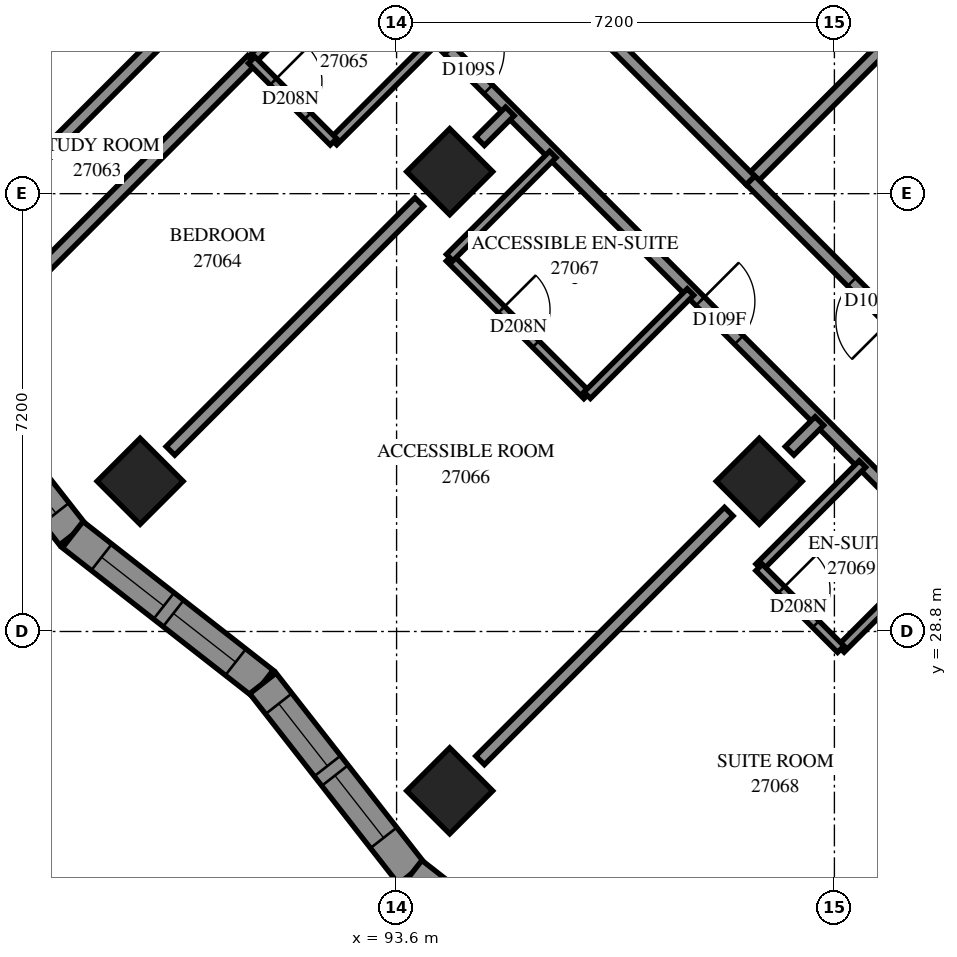
"""IFC4 building model, lengths in metres.
Left out: names, types, materials, properties, quantities, classifications, styles, units other than length and angle.
Written with IfcOpenShell. Run it as: python <this file> out.ifc"""

import sys

from ifc_helpers import new_model, si_unit, direction, frame, frame_2d, origin, origin_2d, place, context, subcontext, project, spatial, polyline, rectangle, outline, extrude, element, fill, save


model = new_model("IFC4")
c1 = context("Model", 3, precision=1e-05, world=origin(), true_north=direction((0.0, 1.0)))
c2 = subcontext(c1, "Body", "Model", "MODEL_VIEW")
j1 = project(units=[si_unit("LENGTHUNIT", "METRE"), si_unit("PLANEANGLEUNIT", "RADIAN")], contexts=[c1])
p1 = place(None, origin())
s1 = spatial("IfcSite", under=j1, at=p1, CompositionType="ELEMENT")
p2 = place(p1, origin())
s2 = spatial("IfcBuilding", under=s1, at=p2, CompositionType="ELEMENT")
p3 = place(p2, frame((0.0, 0.0, 101.6)))
s3 = spatial("IfcBuildingStorey", under=s2, at=p3, CompositionType="ELEMENT", Elevation=101.6)
for number, where, z_axis, x_axis in (
    (1, (94.474, 36.362, 0.0), (0.0, 0.0, 1.0), (0.707, -0.707, 0.0)),
    (2, (89.382, 31.271, 0.0), (0.0, 0.0, 1.0), (0.707, -0.707, 0.0)),
    (3, (99.565, 31.271, 0.0), (0.0, 0.0, 1.0), (0.707, -0.707, 0.0)),
    (4, (94.474, 26.18, 0.0), (0.0, 0.0, 1.0), (0.707, -0.707, 0.0)),
):
    element("IfcColumn", number, at=place(p3, frame(where, z_axis=z_axis, x_axis=x_axis)), inside=s3, PredefinedType="COLUMN", context=c2, shape_type="SweptSolid", body=[
        extrude(rectangle(XDim=1.0, YDim=1.0, at=origin_2d()), origin(), (0.0, 0.0, 1.0), 3.1),
    ])
p4 = place(p3, frame((85.828, 33.52, 0.0), z_axis=(0.0, 0.0, 1.0), x_axis=(0.6160188877, -0.7877313819, 0.0)))
e5 = element("IfcWall", 5, at=p4, inside=s3, PredefinedType="SOLIDWALL", context=c2, shape_type="SweptSolid", body=[
    extrude(outline(polyline([(0.034, -0.275), (4.004, -0.275), (3.936, 0.275), (-0.034, 0.275), (0.034, -0.275)])), origin(), (0.0, 0.0, 1.0), 3.1),
])
p5 = place(p4, frame((0.722, 0.0, 0.5)))
e6 = element("IfcOpeningElement", 6, at=p5, cuts=e5, PredefinedType="OPENING", context=c2, shape_type="SweptSolid", body=[
    extrude(rectangle(XDim=1.3, YDim=2.45, at=frame_2d((0.65, 1.225))), frame((0.0, 0.285, 0.0), z_axis=(0.0, -1.0, 0.0), x_axis=(1.0, 0.0, 0.0)), (0.0, 0.0, 1.0), 0.57),
])
p6 = place(p4, frame((2.222, 0.0, 0.5)))
e7 = element("IfcOpeningElement", 7, at=p6, cuts=e5, PredefinedType="OPENING", context=c2, shape_type="SweptSolid", body=[
    extrude(rectangle(XDim=1.3, YDim=2.45, at=frame_2d((0.65, 1.225))), frame((0.0, 0.285, 0.0), z_axis=(0.0, -1.0, 0.0), x_axis=(1.0, 0.0, 0.0)), (0.0, 0.0, 1.0), 0.57),
])
p7 = place(p3, frame((88.274, 30.392, 0.0), z_axis=(0.0, 0.0, 1.0), x_axis=(0.7877191588, -0.6160345176, 0.0)))
e8 = element("IfcWall", 8, at=p7, inside=s3, PredefinedType="SOLIDWALL", context=c2, shape_type="SweptSolid", body=[
    extrude(outline(polyline([(-0.034, -0.275), (3.936, -0.275), (4.004, 0.275), (0.034, 0.275), (-0.034, -0.275)])), origin(), (0.0, 0.0, 1.0), 3.1),
])
p8 = place(p7, frame((0.602, 0.0, 0.5)))
e9 = element("IfcOpeningElement", 9, at=p8, cuts=e8, PredefinedType="OPENING", context=c2, shape_type="SweptSolid", body=[
    extrude(rectangle(XDim=1.3, YDim=2.45, at=frame_2d((0.65, 1.225))), frame((0.0, 0.285, 0.0), z_axis=(0.0, -1.0, 0.0), x_axis=(1.0, 0.0, 0.0)), (0.0, 0.0, 1.0), 0.57),
])
p9 = place(p7, frame((2.102, 0.0, 0.5)))
e10 = element("IfcOpeningElement", 10, at=p9, cuts=e8, PredefinedType="OPENING", context=c2, shape_type="SweptSolid", body=[
    extrude(rectangle(XDim=1.3, YDim=2.45, at=frame_2d((0.65, 1.225))), frame((0.0, 0.285, 0.0), z_axis=(0.0, -1.0, 0.0), x_axis=(1.0, 0.0, 0.0)), (0.0, 0.0, 1.0), 0.57),
])
p10 = place(p3, frame((91.401, 27.947, 0.0), z_axis=(0.0, 0.0, 1.0), x_axis=(0.6160345176, -0.7877191588, 0.0)))
e11 = element("IfcWall", 11, at=p10, inside=s3, PredefinedType="SOLIDWALL", context=c2, shape_type="SweptSolid", body=[
    extrude(outline(polyline([(0.034, -0.275), (4.004, -0.275), (3.936, 0.275), (-0.034, 0.275), (0.034, -0.275)])), origin(), (0.0, 0.0, 1.0), 3.1),
])
p11 = place(p10, frame((0.424, 0.0, 0.5)))
e12 = element("IfcOpeningElement", 12, at=p11, cuts=e11, PredefinedType="OPENING", context=c2, shape_type="SweptSolid", body=[
    extrude(rectangle(XDim=1.3, YDim=2.45, at=frame_2d((0.65, 1.225))), frame((0.0, 0.285, 0.0), z_axis=(0.0, -1.0, 0.0), x_axis=(1.0, 0.0, 0.0)), (0.0, 0.0, 1.0), 0.57),
])
p12 = place(p10, frame((1.924, 0.0, 0.5)))
e13 = element("IfcOpeningElement", 13, at=p12, cuts=e11, PredefinedType="OPENING", context=c2, shape_type="SweptSolid", body=[
    extrude(rectangle(XDim=1.3, YDim=2.45, at=frame_2d((0.65, 1.225))), frame((0.0, 0.285, 0.0), z_axis=(0.0, -1.0, 0.0), x_axis=(1.0, 0.0, 0.0)), (0.0, 0.0, 1.0), 0.57),
])
p13 = place(p3, frame((93.847, 24.819, 0.0), z_axis=(0.0, 0.0, 1.0), x_axis=(0.7877370809, -0.6160116001, 0.0)))
e14 = element("IfcWall", 14, at=p13, inside=s3, PredefinedType="SOLIDWALL", context=c2, shape_type="SweptSolid", body=[
    extrude(outline(polyline([(-0.034, -0.275), (3.936, -0.275), (4.045, 0.275), (0.034, 0.275), (-0.034, -0.275)])), origin(), (0.0, 0.0, 1.0), 3.1),
])
p14 = place(p13, frame((1.069, 0.0, 0.5)))
e15 = element("IfcOpeningElement", 15, at=p14, cuts=e14, PredefinedType="OPENING", context=c2, shape_type="SweptSolid", body=[
    extrude(rectangle(XDim=1.2, YDim=2.45, at=frame_2d((0.6, 1.225))), frame((0.0, 0.285, 0.0), z_axis=(0.0, -1.0, 0.0), x_axis=(1.0, 0.0, 0.0)), (0.0, 0.0, 1.0), 0.57),
])
p15 = place(p3, frame((92.004, 40.819, 0.0), z_axis=(0.0, 0.0, 1.0), x_axis=(0.7071067812, -0.7071067812, 0.0)))
e16 = element("IfcWall", 16, at=p15, inside=s3, PredefinedType="PARTITIONING", context=c2, shape_type="SweptSolid", body=[
    extrude(rectangle(XDim=19.298, YDim=0.2, at=frame_2d((9.649, 0.0))), origin(), (0.0, 0.0, 1.0), 3.1),
])
p16 = place(p15, frame((3.489, 0.0, 0.0)))
e17 = element("IfcOpeningElement", 17, at=p16, cuts=e16, PredefinedType="OPENING", context=c2, shape_type="SweptSolid", body=[
    extrude(rectangle(XDim=0.9, YDim=2.1, at=frame_2d((0.45, 1.05))), frame((0.0, 0.11, 0.0), z_axis=(0.0, -1.0, 0.0), x_axis=(1.0, 0.0, 0.0)), (0.0, 0.0, 1.0), 0.22),
])
p17 = place(p15, frame((9.319, 0.0, 0.0)))
e18 = element("IfcOpeningElement", 18, at=p17, cuts=e16, PredefinedType="OPENING", context=c2, shape_type="SweptSolid", body=[
    extrude(rectangle(XDim=0.9, YDim=2.1, at=frame_2d((0.45, 1.05))), frame((0.0, 0.11, 0.0), z_axis=(0.0, -1.0, 0.0), x_axis=(1.0, 0.0, 0.0)), (0.0, 0.0, 1.0), 0.22),
])
p18 = place(p15, frame((15.961, 0.0, 0.0)))
e19 = element("IfcOpeningElement", 19, at=p18, cuts=e16, PredefinedType="OPENING", context=c2, shape_type="SweptSolid", body=[
    extrude(rectangle(XDim=0.9, YDim=2.1, at=frame_2d((0.45, 1.05))), frame((0.0, 0.11, 0.0), z_axis=(0.0, -1.0, 0.0), x_axis=(1.0, 0.0, 0.0)), (0.0, 0.0, 1.0), 0.22),
])
p19 = place(p3, frame((99.423, 36.221, 0.0), z_axis=(0.0, 0.0, 1.0), x_axis=(0.7071067812, 0.7071067812, 0.0)))
e20 = element("IfcWall", 20, at=p19, inside=s3, PredefinedType="PARTITIONING", context=c2, shape_type="SweptSolid", body=[
    extrude(rectangle(XDim=12.072, YDim=0.2, at=frame_2d((6.036, 0.0))), origin(), (0.0, 0.0, 1.0), 3.1),
])
p20 = place(p3, frame((93.411, 42.227, 0.0), z_axis=(0.0, 0.0, 1.0), x_axis=(0.7071067812, -0.7071067812, 0.0)))
e21 = element("IfcWall", 21, at=p20, inside=s3, PredefinedType="PARTITIONING", context=c2, shape_type="SweptSolid", body=[
    extrude(rectangle(XDim=8.499, YDim=0.2, at=frame_2d((4.25, 0.0))), origin(), (0.0, 0.0, 1.0), 3.1),
])
p21 = place(p20, frame((3.672, 0.0, 0.0)))
e22 = element("IfcOpeningElement", 22, at=p21, cuts=e21, PredefinedType="OPENING", context=c2, shape_type="SweptSolid", body=[
    extrude(rectangle(XDim=1.0, YDim=2.1, at=frame_2d((0.5, 1.05))), frame((0.0, 0.11, 0.0), z_axis=(0.0, -1.0, 0.0), x_axis=(1.0, 0.0, 0.0)), (0.0, 0.0, 1.0), 0.22),
])
p22 = place(p3, frame((86.835, 35.655, 0.0), z_axis=(0.0, 0.0, 1.0), x_axis=(0.7071067812, 0.7071067812, 0.0)))
e23 = element("IfcWall", 23, at=p22, inside=s3, PredefinedType="PARTITIONING", context=c2, shape_type="SweptSolid", body=[
    extrude(rectangle(XDim=7.3, YDim=0.2, at=frame_2d((3.65, 0.0))), origin(), (0.0, 0.0, 1.0), 3.1),
])
p23 = place(p22, frame((6.046, 0.0, 0.0)))
e24 = element("IfcOpeningElement", 24, at=p23, cuts=e23, PredefinedType="OPENING", context=c2, shape_type="SweptSolid", body=[
    extrude(rectangle(XDim=1.0, YDim=2.1, at=frame_2d((0.5, 1.05))), frame((0.0, 0.11, 0.0), z_axis=(0.0, -1.0, 0.0), x_axis=(1.0, 0.0, 0.0)), (0.0, 0.0, 1.0), 0.22),
])
p24 = place(p3, frame((86.337, 33.315, 0.0), z_axis=(0.0, 0.0, 1.0), x_axis=(0.7069692223, 0.7072443133, 0.0)))
e25 = element("IfcWall", 25, at=p24, inside=s3, PredefinedType="PARTITIONING", context=c2, shape_type="SweptSolid", body=[
    extrude(rectangle(XDim=6.907, YDim=0.2, at=frame_2d((3.453, 0.0))), origin(), (0.0, 0.0, 1.0), 3.1),
])
p25 = place(p3, frame((89.881, 31.771, 0.0), z_axis=(0.0, 0.0, 1.0), x_axis=(0.7071067812, 0.7071067812, 0.0)))
e26 = element("IfcWall", 26, at=p25, inside=s3, PredefinedType="PARTITIONING", context=c2, shape_type="SweptSolid", body=[
    extrude(rectangle(XDim=5.787, YDim=0.2, at=frame_2d((2.893, 0.0))), origin(), (0.0, 0.0, 1.0), 3.1),
])
p26 = place(p3, frame((100.063, 21.589, 0.0), z_axis=(0.0, 0.0, 1.0), x_axis=(0.7071067812, 0.7071067812, 0.0)))
e27 = element("IfcWall", 27, at=p26, inside=s3, PredefinedType="PARTITIONING", context=c2, shape_type="SweptSolid", body=[
    extrude(rectangle(XDim=5.787, YDim=0.2, at=frame_2d((2.893, 0.0))), origin(), (0.0, 0.0, 1.0), 2.6),
])
p27 = place(p3, frame((94.973, 26.681, 0.0), z_axis=(0.0, 0.0, 1.0), x_axis=(0.7071067812, 0.7071067812, 0.0)))
e28 = element("IfcWall", 28, at=p27, inside=s3, PredefinedType="PARTITIONING", context=c2, shape_type="SweptSolid", body=[
    extrude(rectangle(XDim=5.784, YDim=0.2, at=frame_2d((2.892, 0.0))), origin(), (0.0, 0.0, 1.0), 3.1),
])
p28 = place(p3, frame((103.168, 32.47, 0.0), z_axis=(0.0, 0.0, 1.0), x_axis=(-0.7067858967, 0.7074275201, 0.0)))
e29 = element("IfcWall", 29, at=p28, inside=s3, PredefinedType="PARTITIONING", context=c2, shape_type="SweptSolid", body=[
    extrude(rectangle(XDim=5.299, YDim=0.2, at=frame_2d((2.65, 0.0))), origin(), (0.0, 0.0, 1.0), 3.1),
])
p29 = place(p28, frame((2.043, 0.0, 0.0)))
e30 = element("IfcOpeningElement", 30, at=p29, cuts=e29, PredefinedType="OPENING", context=c2, shape_type="SweptSolid", body=[
    extrude(rectangle(XDim=0.9, YDim=2.1, at=frame_2d((0.45, 1.05))), frame((0.0, 0.11, 0.0), z_axis=(0.0, -1.0, 0.0), x_axis=(1.0, 0.0, 0.0)), (0.0, 0.0, 1.0), 0.22),
])
p30 = place(p3, frame((94.471, 34.945, 0.0), z_axis=(0.0, 0.0, 1.0), x_axis=(0.7067942478, -0.7074191764, 0.0)))
e31 = element("IfcWall", 31, at=p30, inside=s3, PredefinedType="PARTITIONING", context=c2, shape_type="SweptSolid", body=[
    extrude(rectangle(XDim=3.2, YDim=0.15, at=frame_2d((1.6, 0.0))), origin(), (0.0, 0.0, 1.0), 3.1),
])
p31 = place(p30, frame((1.206, 0.0, 0.0)))
e32 = element("IfcOpeningElement", 32, at=p31, cuts=e31, PredefinedType="OPENING", context=c2, shape_type="SweptSolid", body=[
    extrude(rectangle(XDim=0.8, YDim=2.1, at=frame_2d((0.4, 1.05))), frame((0.0, 0.085, 0.0), z_axis=(0.0, -1.0, 0.0), x_axis=(1.0, 0.0, 0.0)), (0.0, 0.0, 1.0), 0.17),
])
for number, where, z_axis, x_axis in (
    (33, (92.563, 36.857, 0.0), (0.0, 0.0, 1.0), (0.707, 0.707, 0.0)),
    (34, (91.219, 38.201, 0.0), (0.0, 0.0, 1.0), (0.707, 0.707, 0.0)),
    (35, (96.735, 32.685, 0.0), (0.0, 0.0, 1.0), (0.707, 0.707, 0.0)),
    (36, (99.563, 29.857, 0.0), (0.0, 0.0, 1.0), (0.707, 0.707, 0.0)),
    (37, (100.907, 28.513, 0.0), (0.0, 0.0, 1.0), (0.707, 0.707, 0.0)),
):
    element("IfcWall", number, at=place(p3, frame(where, z_axis=z_axis, x_axis=x_axis)), inside=s3, PredefinedType="PARTITIONING", context=c2, shape_type="SweptSolid", body=[
        extrude(rectangle(XDim=2.401, YDim=0.15, at=frame_2d((1.201, 0.0))), origin(), (0.0, 0.0, 1.0), 3.1),
    ])
p32 = place(p3, frame((94.473, 34.949, 0.0), z_axis=(0.0, 0.0, 1.0), x_axis=(0.7071067812, 0.7071067812, 0.0)))
e38 = element("IfcWall", 38, at=p32, inside=s3, PredefinedType="PARTITIONING", context=c2, shape_type="SweptSolid", body=[
    extrude(rectangle(XDim=2.398, YDim=0.15, at=frame_2d((1.199, 0.0))), origin(), (0.0, 0.0, 1.0), 3.1),
])
p33 = place(p3, frame((99.561, 29.853, 0.0), z_axis=(0.0, 0.0, 1.0), x_axis=(0.7071067812, -0.7071067812, 0.0)))
e39 = element("IfcWall", 39, at=p33, inside=s3, PredefinedType="PARTITIONING", context=c2, shape_type="SweptSolid", body=[
    extrude(rectangle(XDim=1.901, YDim=0.15, at=frame_2d((0.95, 0.0))), origin(), (0.0, 0.0, 1.0), 3.1),
])
p34 = place(p33, frame((0.519, 0.0, 0.0)))
e40 = element("IfcOpeningElement", 40, at=p34, cuts=e39, PredefinedType="OPENING", context=c2, shape_type="SweptSolid", body=[
    extrude(rectangle(XDim=0.8, YDim=2.1, at=frame_2d((0.4, 1.05))), frame((0.0, 0.085, 0.0), z_axis=(0.0, -1.0, 0.0), x_axis=(1.0, 0.0, 0.0)), (0.0, 0.0, 1.0), 0.17),
])
p35 = place(p3, frame((91.217, 38.197, 0.0), z_axis=(0.0, 0.0, 1.0), x_axis=(0.7071067812, -0.7071067812, 0.0)))
e41 = element("IfcWall", 41, at=p35, inside=s3, PredefinedType="PARTITIONING", context=c2, shape_type="SweptSolid", body=[
    extrude(rectangle(XDim=1.901, YDim=0.15, at=frame_2d((0.95, 0.0))), origin(), (0.0, 0.0, 1.0), 3.1),
])
p36 = place(p35, frame((0.502, 0.0, 0.0)))
e42 = element("IfcOpeningElement", 42, at=p36, cuts=e41, PredefinedType="OPENING", context=c2, shape_type="SweptSolid", body=[
    extrude(rectangle(XDim=0.8, YDim=2.1, at=frame_2d((0.4, 1.05))), frame((0.0, 0.085, 0.0), z_axis=(0.0, -1.0, 0.0), x_axis=(1.0, 0.0, 0.0)), (0.0, 0.0, 1.0), 0.17),
])
for number, where, z_axis, x_axis in (
    (43, (94.973, 36.863, 0.0), (0.0, 0.0, 1.0), (0.707, 0.707, 0.0)),
    (44, (100.063, 31.771, 0.0), (0.0, 0.0, 1.0), (0.707, 0.707, 0.0)),
):
    element("IfcWall", number, at=place(p3, frame(where, z_axis=z_axis, x_axis=x_axis)), inside=s3, PredefinedType="PARTITIONING", context=c2, shape_type="SweptSolid", body=[
        extrude(rectangle(XDim=0.693, YDim=0.2, at=frame_2d((0.346, 0.0))), origin(), (0.0, 0.0, 1.0), 3.1),
    ])
p37 = place(p6, origin())
e45 = element("IfcWindow", 45, at=p37, inside=s3, PartitioningType="SINGLE_PANEL", PredefinedType="WINDOW", context=c2, shape_type="SweptSolid", body=[
    extrude(rectangle(XDim=1.3, YDim=2.45, at=frame_2d((0.65, 1.225))), frame((0.0, 0.155, 0.0), z_axis=(0.0, -1.0, 0.0), x_axis=(1.0, 0.0, 0.0)), (0.0, 0.0, 1.0), 0.06),
])
fill(e7, e45)
p38 = place(p8, origin())
e46 = element("IfcWindow", 46, at=p38, inside=s3, PartitioningType="SINGLE_PANEL", PredefinedType="WINDOW", context=c2, shape_type="SweptSolid", body=[
    extrude(rectangle(XDim=1.3, YDim=2.45, at=frame_2d((0.65, 1.225))), frame((0.0, 0.155, 0.0), z_axis=(0.0, -1.0, 0.0), x_axis=(1.0, 0.0, 0.0)), (0.0, 0.0, 1.0), 0.06),
])
fill(e9, e46)
p39 = place(p9, origin())
e47 = element("IfcWindow", 47, at=p39, inside=s3, PartitioningType="SINGLE_PANEL", PredefinedType="WINDOW", context=c2, shape_type="SweptSolid", body=[
    extrude(rectangle(XDim=1.3, YDim=2.45, at=frame_2d((0.65, 1.225))), frame((0.0, 0.155, 0.0), z_axis=(0.0, -1.0, 0.0), x_axis=(1.0, 0.0, 0.0)), (0.0, 0.0, 1.0), 0.06),
])
fill(e10, e47)
p40 = place(p11, origin())
e48 = element("IfcWindow", 48, at=p40, inside=s3, PartitioningType="SINGLE_PANEL", PredefinedType="WINDOW", context=c2, shape_type="SweptSolid", body=[
    extrude(rectangle(XDim=1.3, YDim=2.45, at=frame_2d((0.65, 1.225))), frame((0.0, 0.155, 0.0), z_axis=(0.0, -1.0, 0.0), x_axis=(1.0, 0.0, 0.0)), (0.0, 0.0, 1.0), 0.06),
])
fill(e12, e48)
p41 = place(p12, origin())
e49 = element("IfcWindow", 49, at=p41, inside=s3, PartitioningType="SINGLE_PANEL", PredefinedType="WINDOW", context=c2, shape_type="SweptSolid", body=[
    extrude(rectangle(XDim=1.3, YDim=2.45, at=frame_2d((0.65, 1.225))), frame((0.0, 0.155, 0.0), z_axis=(0.0, -1.0, 0.0), x_axis=(1.0, 0.0, 0.0)), (0.0, 0.0, 1.0), 0.06),
])
fill(e13, e49)
p42 = place(p29, origin())
e50 = element("IfcDoor", 50, at=p42, inside=s3, OperationType="SINGLE_SWING_RIGHT", PredefinedType="DOOR", context=c2, shape_type="SweptSolid", body=[
    extrude(rectangle(XDim=0.9, YDim=2.1, at=frame_2d((0.45, 1.05))), frame((0.0, 0.025, 0.0), z_axis=(0.0, -1.0, 0.0), x_axis=(1.0, 0.0, 0.0)), (0.0, 0.0, 1.0), 0.05),
])
fill(e30, e50)
p43 = place(p16, origin())
e51 = element("IfcDoor", 51, at=p43, inside=s3, OperationType="SINGLE_SWING_LEFT", PredefinedType="DOOR", context=c2, shape_type="SweptSolid", body=[
    extrude(rectangle(XDim=0.9, YDim=2.1, at=frame_2d((0.45, 1.05))), frame((0.0, 0.025, 0.0), z_axis=(0.0, -1.0, 0.0), x_axis=(1.0, 0.0, 0.0)), (0.0, 0.0, 1.0), 0.05),
])
fill(e17, e51)
p44 = place(p36, origin())
e52 = element("IfcDoor", 52, at=p44, inside=s3, OperationType="SINGLE_SWING_RIGHT", PredefinedType="DOOR", context=c2, shape_type="SweptSolid", body=[
    extrude(rectangle(XDim=0.8, YDim=2.1, at=frame_2d((0.4, 1.05))), frame((0.0, 0.025, 0.0), z_axis=(0.0, -1.0, 0.0), x_axis=(1.0, 0.0, 0.0)), (0.0, 0.0, 1.0), 0.05),
])
fill(e42, e52)
p45 = place(p17, origin())
e53 = element("IfcDoor", 53, at=p45, inside=s3, OperationType="SINGLE_SWING_RIGHT", PredefinedType="DOOR", context=c2, shape_type="SweptSolid", body=[
    extrude(rectangle(XDim=0.9, YDim=2.1, at=frame_2d((0.45, 1.05))), frame((0.0, 0.025, 0.0), z_axis=(0.0, -1.0, 0.0), x_axis=(1.0, 0.0, 0.0)), (0.0, 0.0, 1.0), 0.05),
])
fill(e18, e53)
p46 = place(p31, origin())
e54 = element("IfcDoor", 54, at=p46, inside=s3, OperationType="SINGLE_SWING_RIGHT", PredefinedType="DOOR", context=c2, shape_type="SweptSolid", body=[
    extrude(rectangle(XDim=0.8, YDim=2.1, at=frame_2d((0.4, 1.05))), frame((0.0, 0.025, 0.0), z_axis=(0.0, -1.0, 0.0), x_axis=(1.0, 0.0, 0.0)), (0.0, 0.0, 1.0), 0.05),
])
fill(e32, e54)
p47 = place(p34, origin())
e55 = element("IfcDoor", 55, at=p47, inside=s3, OperationType="SINGLE_SWING_RIGHT", PredefinedType="DOOR", context=c2, shape_type="SweptSolid", body=[
    extrude(rectangle(XDim=0.8, YDim=2.1, at=frame_2d((0.4, 1.05))), frame((0.0, 0.025, 0.0), z_axis=(0.0, -1.0, 0.0), x_axis=(1.0, 0.0, 0.0)), (0.0, 0.0, 1.0), 0.05),
])
fill(e40, e55)
save(model, sys.argv[1])
